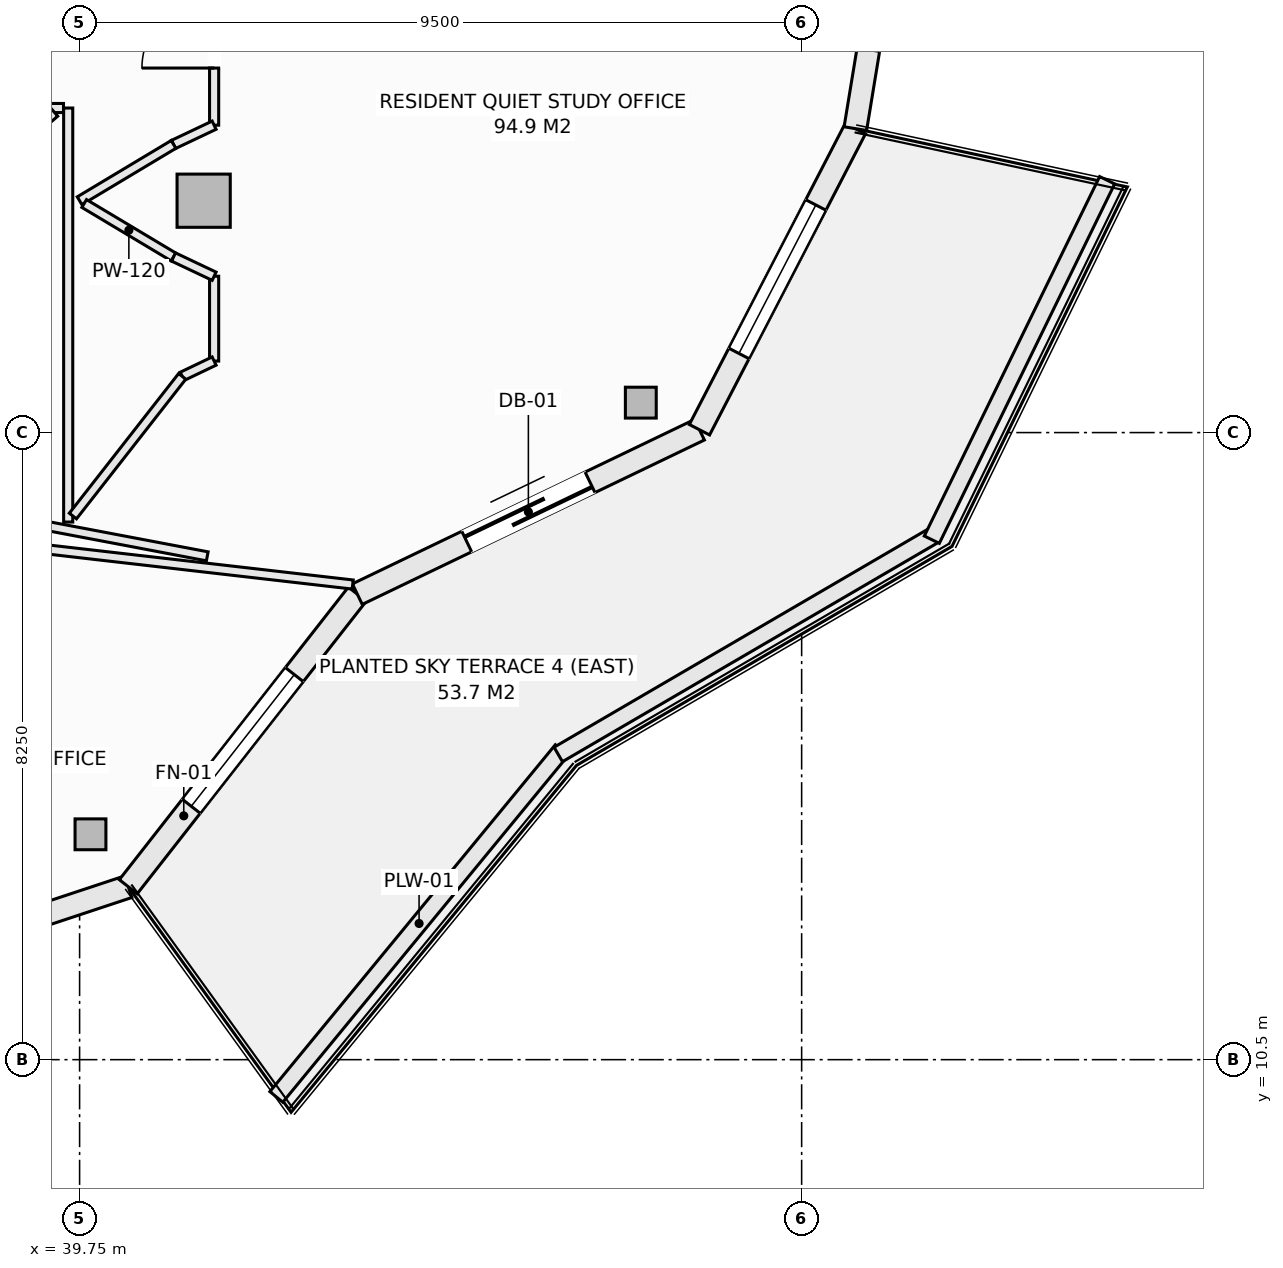
"""IFC4 building model, lengths in metres.
Left out: names, types, materials, properties, quantities, classifications, styles, units other than length and angle.
Written with IfcOpenShell. Run it as: python <this file> out.ifc"""

import sys

from ifc_helpers import new_model, si_unit, direction, frame, frame_2d, origin, origin_2d, place, context, subcontext, project, spatial, rectangle, hollow_rectangle, extrude, element, fill, save


model = new_model("IFC4")
c1 = context("Model", 3, precision=1e-05, world=origin(), true_north=direction((0.0, 1.0)))
c2 = subcontext(c1, "Body", "Model", "MODEL_VIEW")
j1 = project(units=[si_unit("LENGTHUNIT", "METRE"), si_unit("PLANEANGLEUNIT", "RADIAN")], contexts=[c1])
p1 = place(None, origin())
s1 = spatial("IfcSite", under=j1, at=p1, CompositionType="ELEMENT")
p2 = place(p1, origin())
s2 = spatial("IfcBuilding", under=s1, at=p2, CompositionType="ELEMENT")
p3 = place(p2, frame((0.0, 0.0, 259.1)))
s3 = spatial("IfcBuildingStorey", under=s2, at=p3, CompositionType="ELEMENT", Elevation=259.1)
for number, where, z_axis, x_axis in (
    (1, (39.893, 13.465, -0.27), (0.0, 0.0, 1.0), (1.0, 0.0, 0.0)),
    (2, (47.134, 19.144, -0.27), (0.0, 0.0, 1.0), (1.0, 0.0, 0.0)),
):
    element("IfcColumn", number, at=place(p3, frame(where, z_axis=z_axis, x_axis=x_axis)), inside=s3, PredefinedType="COLUMN", context=c2, shape_type="SweptSolid", body=[
        extrude(hollow_rectangle(XDim=0.406, YDim=0.406, WallThickness=0.016, at=origin_2d()), origin(), (0.0, 0.0, 1.0), 3.3),
    ])
p4 = place(p3, frame((41.382, 21.801, -0.27), z_axis=(0.0, 0.0, 1.0), x_axis=(1.0, 0.0, 0.0)))
e3 = element("IfcColumn", 3, at=p4, inside=s3, PredefinedType="COLUMN", context=c2, shape_type="SweptSolid", body=[
    extrude(rectangle(XDim=0.7, YDim=0.7, at=origin_2d()), origin(), (0.0, 0.0, 1.0), 3.3),
])
p5 = place(p3, frame((35.439, 11.135, 0.0), z_axis=(0.0, 0.0, 1.0), x_axis=(0.949252744709, 0.314514271001, 0.0)))
e4 = element("IfcWall", 4, at=p5, inside=s3, PredefinedType="SOLIDWALL", context=c2, shape_type="SweptSolid", body=[
    extrude(rectangle(XDim=5.216, YDim=0.3, at=frame_2d((2.608, 0.0))), origin(), (0.0, 0.0, 1.0), 2.605),
])
p6 = place(p5, frame((1.508, 0.0, 0.72)))
e5 = element("IfcOpeningElement", 5, at=p6, cuts=e4, PredefinedType="OPENING", context=c2, shape_type="SweptSolid", body=[
    extrude(rectangle(XDim=2.2, YDim=1.65, at=frame_2d((1.1, 0.825))), frame((0.0, 0.16, 0.0), z_axis=(0.0, -1.0, 0.0), x_axis=(1.0, 0.0, 0.0)), (0.0, 0.0, 1.0), 0.32),
])
p7 = place(p3, frame((40.391, 12.775, 0.0), z_axis=(0.0, 0.0, 1.0), x_axis=(0.616413297421, 0.78742278781, 0.0)))
e6 = element("IfcWall", 6, at=p7, inside=s3, PredefinedType="SOLIDWALL", context=c2, shape_type="SweptSolid", body=[
    extrude(rectangle(XDim=4.888, YDim=0.3, at=frame_2d((2.444, 0.0))), origin(), (0.0, 0.0, 1.0), 2.605),
])
p8 = place(p7, frame((1.344, 0.0, 0.72)))
e7 = element("IfcOpeningElement", 7, at=p8, cuts=e6, PredefinedType="OPENING", context=c2, shape_type="SweptSolid", body=[
    extrude(rectangle(XDim=2.2, YDim=1.65, at=frame_2d((1.1, 0.825))), frame((0.0, 0.16, 0.0), z_axis=(0.0, -1.0, 0.0), x_axis=(1.0, 0.0, 0.0)), (0.0, 0.0, 1.0), 0.32),
])
p9 = place(p3, frame((43.404, 16.625, 0.0), z_axis=(0.0, 0.0, 1.0), x_axis=(0.901346013132, 0.433099716706, 0.0)))
e8 = element("IfcWall", 8, at=p9, inside=s3, PredefinedType="SOLIDWALL", context=c2, shape_type="SweptSolid", body=[
    extrude(rectangle(XDim=4.994, YDim=0.3, at=frame_2d((2.497, 0.0))), origin(), (0.0, 0.0, 1.0), 2.605),
])
p10 = place(p9, frame((1.597, 0.0, 0.0)))
e9 = element("IfcOpeningElement", 9, at=p10, cuts=e8, PredefinedType="OPENING", context=c2, shape_type="SweptSolid", body=[
    extrude(rectangle(XDim=1.8, YDim=2.25, at=frame_2d((0.9, 1.125))), frame((0.0, 0.16, 0.0), z_axis=(0.0, -1.0, 0.0), x_axis=(1.0, 0.0, 0.0)), (0.0, 0.0, 1.0), 0.32),
])
p11 = place(p3, frame((47.906, 18.788, 0.0), z_axis=(0.0, 0.0, 1.0), x_axis=(0.459801070243, 0.888021945564, 0.0)))
e10 = element("IfcWall", 10, at=p11, inside=s3, PredefinedType="SOLIDWALL", context=c2, shape_type="SweptSolid", body=[
    extrude(rectangle(XDim=4.461, YDim=0.3, at=frame_2d((2.23, 0.0))), origin(), (0.0, 0.0, 1.0), 2.605),
])
p12 = place(p11, frame((1.13, 0.0, 0.72)))
e11 = element("IfcOpeningElement", 11, at=p12, cuts=e10, PredefinedType="OPENING", context=c2, shape_type="SweptSolid", body=[
    extrude(rectangle(XDim=2.2, YDim=1.65, at=frame_2d((1.1, 0.825))), frame((0.0, 0.16, 0.0), z_axis=(0.0, -1.0, 0.0), x_axis=(1.0, 0.0, 0.0)), (0.0, 0.0, 1.0), 0.32),
])
p13 = place(p3, frame((49.957, 22.749, 0.0), z_axis=(0.0, 0.0, 1.0), x_axis=(0.162404622434, 0.98672424649, 0.0)))
e12 = element("IfcWall", 12, at=p13, inside=s3, PredefinedType="SOLIDWALL", context=c2, shape_type="SweptSolid", body=[
    extrude(rectangle(XDim=4.308, YDim=0.3, at=frame_2d((2.154, 0.0))), origin(), (0.0, 0.0, 1.0), 2.605),
])
p14 = place(p13, frame((1.054, 0.0, 0.72)))
e13 = element("IfcOpeningElement", 13, at=p14, cuts=e12, PredefinedType="OPENING", context=c2, shape_type="SweptSolid", body=[
    extrude(rectangle(XDim=2.2, YDim=1.65, at=frame_2d((1.1, 0.825))), frame((0.0, 0.16, 0.0), z_axis=(0.0, -1.0, 0.0), x_axis=(1.0, 0.0, 0.0)), (0.0, 0.0, 1.0), 0.32),
])
p15 = place(p3, frame((42.339, 10.01, 0.0), z_axis=(0.0, 0.0, 1.0), x_axis=(0.635450933862, 0.772141250455, 0.0)))
e14 = element("IfcWall", 14, at=p15, inside=s3, PredefinedType="PARAPET", context=c2, shape_type="SweptSolid", body=[
    extrude(rectangle(XDim=5.91, YDim=0.22, at=frame_2d((2.955, 0.0))), origin(), (0.0, 0.0, 1.0), 0.52),
])
p16 = place(p3, frame((46.048, 14.515, 0.0), z_axis=(0.0, 0.0, 1.0), x_axis=(0.863803671285, 0.503828559606, 0.0)))
e15 = element("IfcWall", 15, at=p16, inside=s3, PredefinedType="PARAPET", context=c2, shape_type="SweptSolid", body=[
    extrude(rectangle(XDim=5.719, YDim=0.22, at=frame_2d((2.86, 0.0))), origin(), (0.0, 0.0, 1.0), 0.52),
])
p17 = place(p3, frame((50.962, 17.341, 0.0), z_axis=(0.0, 0.0, 1.0), x_axis=(0.438469339137, 0.898746148051, 0.0)))
e16 = element("IfcWall", 16, at=p17, inside=s3, PredefinedType="PARAPET", context=c2, shape_type="SweptSolid", body=[
    extrude(rectangle(XDim=5.262, YDim=0.22, at=frame_2d((2.631, 0.0))), origin(), (0.0, 0.0, 1.0), 0.52),
])
p18 = place(p3, frame((39.6, 17.573, 0.0), z_axis=(0.0, 0.0, 1.0), x_axis=(0.0, 1.0, 0.0)))
e17 = element("IfcWall", 17, at=p18, inside=s3, PredefinedType="PARTITIONING", context=c2, shape_type="SweptSolid", body=[
    extrude(rectangle(XDim=5.447, YDim=0.12, at=frame_2d((2.724, 0.0))), origin(), (0.0, 0.0, 1.0), 2.478),
])
p19 = place(p3, frame((41.52, 19.691, 0.0), z_axis=(0.0, 0.0, 1.0), x_axis=(0.0, 1.0, 0.0)))
e18 = element("IfcWall", 18, at=p19, inside=s3, PredefinedType="PARTITIONING", context=c2, shape_type="SweptSolid", body=[
    extrude(rectangle(XDim=1.116, YDim=0.12, at=frame_2d((0.558, 0.0))), origin(), (0.0, 0.0, 1.0), 3.03),
])
p20 = place(p3, frame((41.52, 22.794, 0.0), z_axis=(0.0, 0.0, 1.0), x_axis=(0.0, 1.0, 0.0)))
e19 = element("IfcWall", 19, at=p20, inside=s3, PredefinedType="PARTITIONING", context=c2, shape_type="SweptSolid", body=[
    extrude(rectangle(XDim=8.412, YDim=0.12, at=frame_2d((4.206, 0.0))), origin(), (0.0, 0.0, 1.0), 2.478),
])
p21 = place(p20, frame((0.752, 0.0, 0.0)))
e20 = element("IfcOpeningElement", 20, at=p21, cuts=e19, PredefinedType="OPENING", context=c2, shape_type="SweptSolid", body=[
    extrude(rectangle(XDim=0.95, YDim=2.1, at=frame_2d((0.475, 1.05))), frame((0.0, 0.07, 0.0), z_axis=(0.0, -1.0, 0.0), x_axis=(1.0, 0.0, 0.0)), (0.0, 0.0, 1.0), 0.14),
])
p22 = place(p20, frame((5.031, 0.0, 0.0)))
e21 = element("IfcOpeningElement", 21, at=p22, cuts=e19, PredefinedType="OPENING", context=c2, shape_type="SweptSolid", body=[
    extrude(rectangle(XDim=0.95, YDim=2.1, at=frame_2d((0.475, 1.05))), frame((0.0, 0.07, 0.0), z_axis=(0.0, -1.0, 0.0), x_axis=(1.0, 0.0, 0.0)), (0.0, 0.0, 1.0), 0.14),
])
p23 = place(p3, frame((40.986, 22.541, 0.0), z_axis=(0.0, 0.0, 1.0), x_axis=(0.903729424576, 0.428104107847, 0.0)))
e22 = element("IfcWall", 22, at=p23, inside=s3, PredefinedType="PARTITIONING", context=c2, shape_type="SweptSolid", body=[
    extrude(rectangle(XDim=0.591, YDim=0.12, at=frame_2d((0.295, 0.0))), origin(), (0.0, 0.0, 1.0), 3.03),
])
p24 = place(p3, frame((39.75, 21.8, 0.0), z_axis=(0.0, 0.0, 1.0), x_axis=(0.857702120906, 0.514146935996, 0.0)))
e23 = element("IfcWall", 23, at=p24, inside=s3, PredefinedType="PARTITIONING", context=c2, shape_type="SweptSolid", body=[
    extrude(rectangle(XDim=1.441, YDim=0.12, at=frame_2d((0.721, 0.0))), origin(), (0.0, 0.0, 1.0), 3.03),
])
p25 = place(p3, frame((39.81, 21.764, 0.0), z_axis=(0.0, 0.0, 1.0), x_axis=(0.858011245414, -0.513630901273, 0.0)))
e24 = element("IfcWall", 24, at=p25, inside=s3, PredefinedType="PARTITIONING", context=c2, shape_type="SweptSolid", body=[
    extrude(rectangle(XDim=1.37, YDim=0.12, at=frame_2d((0.685, 0.0))), origin(), (0.0, 0.0, 1.0), 3.03),
])
p26 = place(p3, frame((40.986, 21.06, 0.0), z_axis=(0.0, 0.0, 1.0), x_axis=(0.90356951601, -0.428441512621, 0.0)))
e25 = element("IfcWall", 25, at=p26, inside=s3, PredefinedType="PARTITIONING", context=c2, shape_type="SweptSolid", body=[
    extrude(rectangle(XDim=0.591, YDim=0.12, at=frame_2d((0.295, 0.0))), origin(), (0.0, 0.0, 1.0), 3.03),
])
p27 = place(p3, frame((41.1, 19.49, 0.0), z_axis=(0.0, 0.0, 1.0), x_axis=(0.902054328377, 0.431622507125, 0.0)))
e26 = element("IfcWall", 26, at=p27, inside=s3, PredefinedType="PARTITIONING", context=c2, shape_type="SweptSolid", body=[
    extrude(rectangle(XDim=0.466, YDim=0.12, at=frame_2d((0.233, 0.0))), origin(), (0.0, 0.0, 1.0), 3.03),
])
p28 = place(p3, frame((39.662, 17.652, 0.0), z_axis=(0.0, 0.0, 1.0), x_axis=(0.616212345115, 0.78758005671, 0.0)))
e27 = element("IfcWall", 27, at=p28, inside=s3, PredefinedType="PARTITIONING", context=c2, shape_type="SweptSolid", body=[
    extrude(rectangle(XDim=2.333, YDim=0.12, at=frame_2d((1.167, 0.0))), origin(), (0.0, 0.0, 1.0), 2.478),
])
p29 = place(p3, frame((39.0, 23.02, 0.0), z_axis=(0.0, 0.0, 1.0), x_axis=(1.0, 0.0, 0.0)))
e28 = element("IfcWall", 28, at=p29, inside=s3, PredefinedType="PARTITIONING", context=c2, shape_type="SweptSolid", body=[
    extrude(rectangle(XDim=0.538, YDim=0.12, at=frame_2d((0.269, 0.0))), origin(), (0.0, 0.0, 1.0), 3.03),
])
p30 = place(p3, frame((39.02, 22.611, 0.0), z_axis=(0.0, 0.0, 1.0), x_axis=(0.75812166899, 0.652113130529, 0.0)))
e29 = element("IfcWall", 29, at=p30, inside=s3, PredefinedType="PARTITIONING", context=c2, shape_type="SweptSolid", body=[
    extrude(rectangle(XDim=0.532, YDim=0.12, at=frame_2d((0.266, 0.0))), origin(), (0.0, 0.0, 1.0), 3.03),
])
p31 = place(p3, frame((36.972, 17.483, 0.0), z_axis=(0.0, 0.0, 1.0), x_axis=(0.993465006101, -0.114137117773, 0.0)))
e30 = element("IfcWall", 30, at=p31, inside=s3, PredefinedType="PARTITIONING", context=c2, shape_type="SweptSolid", body=[
    extrude(rectangle(XDim=6.413, YDim=0.12, at=frame_2d((3.207, 0.0))), origin(), (0.0, 0.0, 1.0), 2.77),
])
p32 = place(p3, frame((38.8, 17.62, 0.0), z_axis=(0.0, 0.0, 1.0), x_axis=(0.982513005499, -0.186193968823, 0.0)))
e31 = element("IfcWall", 31, at=p32, inside=s3, PredefinedType="PARTITIONING", context=c2, shape_type="SweptSolid", body=[
    extrude(rectangle(XDim=2.676, YDim=0.12, at=frame_2d((1.338, 0.0))), origin(), (0.0, 0.0, 1.0), 3.03),
])
p33 = place(p8, origin())
e32 = element("IfcWindow", 32, at=p33, inside=s3, PartitioningType="SINGLE_PANEL", PredefinedType="WINDOW", context=c2, shape_type="SweptSolid", body=[
    extrude(rectangle(XDim=2.2, YDim=1.65, at=frame_2d((1.1, 0.825))), frame((0.0, 0.03, 0.0), z_axis=(0.0, -1.0, 0.0), x_axis=(1.0, 0.0, 0.0)), (0.0, 0.0, 1.0), 0.06),
])
fill(e7, e32)
p34 = place(p10, frame((1.8, 0.0, 0.0), z_axis=(0.0, 0.0, 1.0), x_axis=(-1.0, 0.0, 0.0)))
e33 = element("IfcDoor", 33, at=p34, inside=s3, OperationType="SLIDING_TO_LEFT", PredefinedType="DOOR", context=c2, shape_type="SweptSolid", body=[
    extrude(rectangle(XDim=1.8, YDim=2.25, at=frame_2d((0.9, 1.125))), frame((0.0, 0.025, 0.0), z_axis=(0.0, -1.0, 0.0), x_axis=(1.0, 0.0, 0.0)), (0.0, 0.0, 1.0), 0.05),
])
fill(e9, e33)
p35 = place(p12, origin())
e34 = element("IfcWindow", 34, at=p35, inside=s3, PartitioningType="SINGLE_PANEL", PredefinedType="WINDOW", context=c2, shape_type="SweptSolid", body=[
    extrude(rectangle(XDim=2.2, YDim=1.65, at=frame_2d((1.1, 0.825))), frame((0.0, 0.03, 0.0), z_axis=(0.0, -1.0, 0.0), x_axis=(1.0, 0.0, 0.0)), (0.0, 0.0, 1.0), 0.06),
])
fill(e11, e34)
p36 = place(p21, origin())
e35 = element("IfcDoor", 35, at=p36, inside=s3, OperationType="SINGLE_SWING_LEFT", PredefinedType="DOOR", context=c2, shape_type="SweptSolid", body=[
    extrude(rectangle(XDim=0.95, YDim=2.1, at=frame_2d((0.475, 1.05))), frame((0.0, 0.025, 0.0), z_axis=(0.0, -1.0, 0.0), x_axis=(1.0, 0.0, 0.0)), (0.0, 0.0, 1.0), 0.05),
])
fill(e20, e35)
save(model, sys.argv[1])
